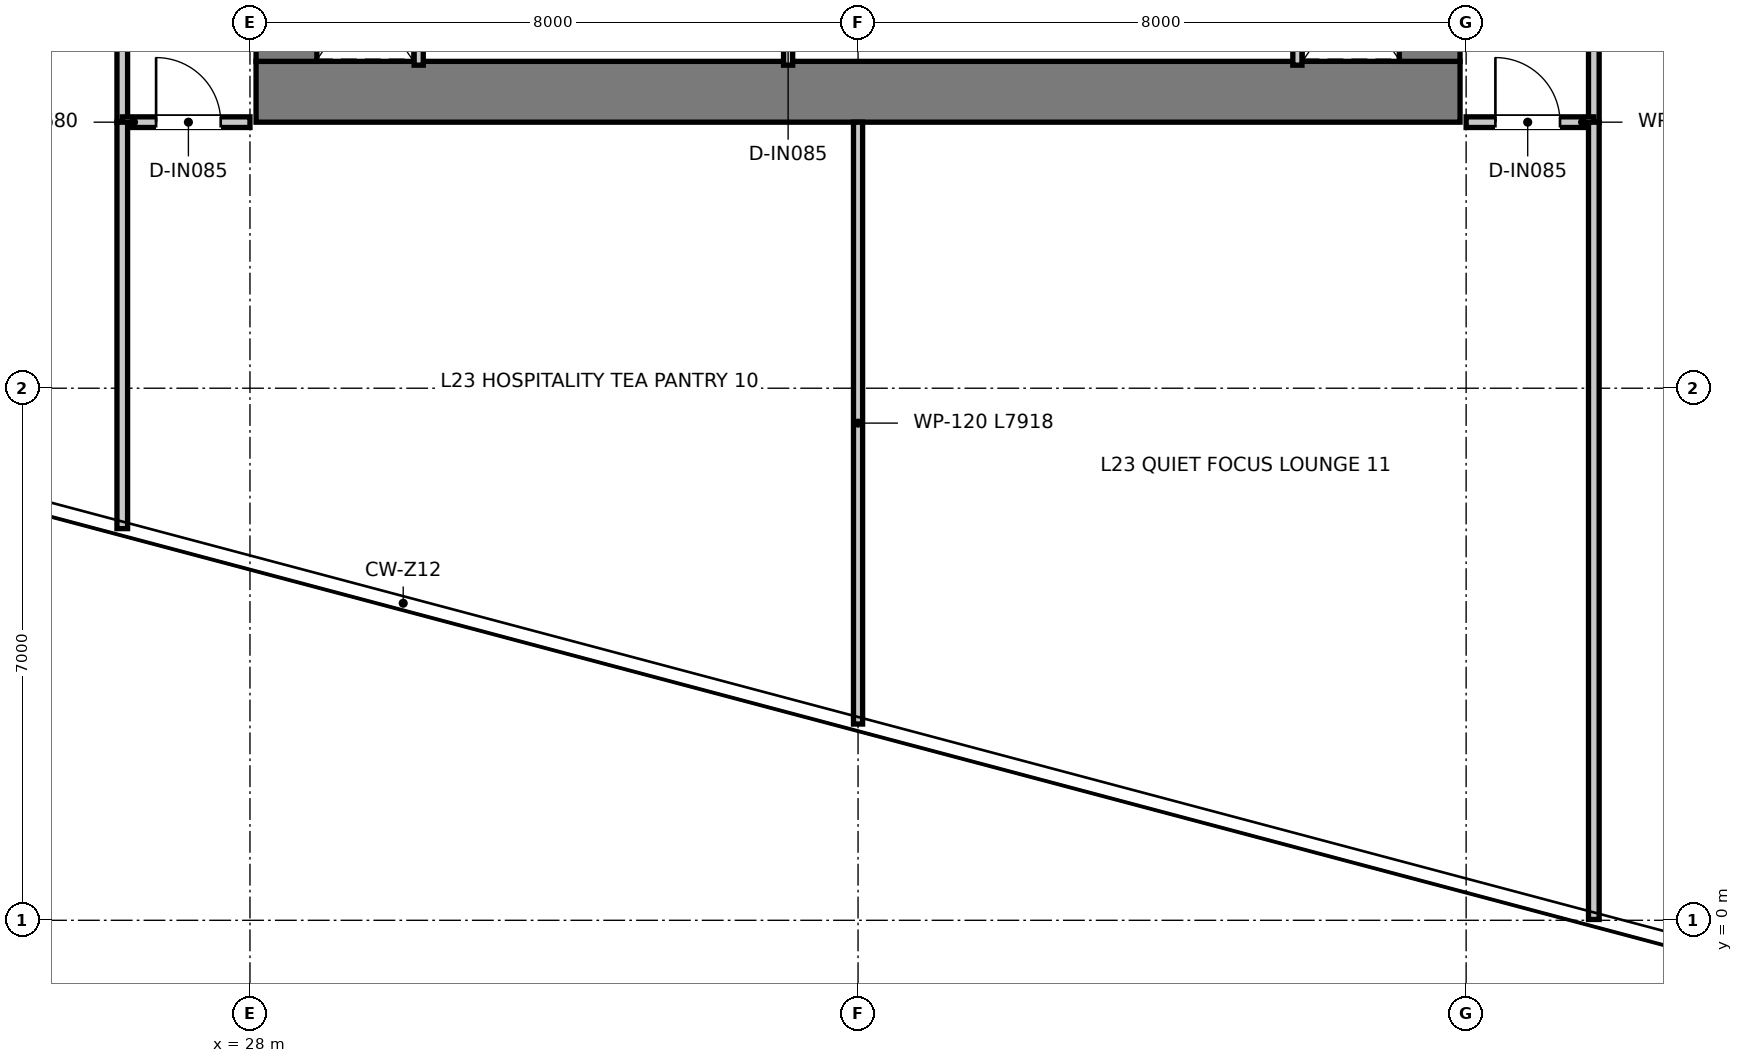
"""IFC4 building model, lengths in metres.
Left out: names, types, materials, properties, quantities, classifications, styles, units other than length and angle.
Written with IfcOpenShell. Run it as: python <this file> out.ifc"""

import sys

from ifc_helpers import new_model, si_unit, direction, frame, frame_2d, origin, place, context, subcontext, project, spatial, rectangle, extrude, element, fill, save


model = new_model("IFC4")
c1 = context("Model", 3, precision=1e-05, world=origin(), true_north=direction((0.0, 1.0)))
c2 = subcontext(c1, "Body", "Model", "MODEL_VIEW")
j1 = project(units=[si_unit("LENGTHUNIT", "METRE"), si_unit("PLANEANGLEUNIT", "RADIAN")], contexts=[c1])
p1 = place(None, origin())
s1 = spatial("IfcSite", under=j1, at=p1, CompositionType="ELEMENT")
p2 = place(p1, origin())
s2 = spatial("IfcBuilding", under=s1, at=p2, CompositionType="ELEMENT")
p3 = place(p2, frame((0.0, 0.0, 97.95)))
s3 = spatial("IfcBuildingStorey", under=s2, at=p3, CompositionType="ELEMENT", Elevation=97.95)
p4 = place(p3, frame((28.08, 10.9, 0.0), z_axis=(0.0, 0.0, 1.0), x_axis=(1.0, 0.0, 0.0)))
e1 = element("IfcWall", 1, at=p4, inside=s3, PredefinedType="SHEAR", context=c2, shape_type="SweptSolid", body=[
    extrude(rectangle(XDim=15.84, YDim=0.8, at=frame_2d((7.92, 0.0))), origin(), (0.0, 0.0, 1.0), 3.95),
])
for number, where, z_axis, x_axis in (
    (2, (28.48, 11.3, 0.0), (0.0, 0.0, 1.0), (0.0, 1.0, 0.0)),
    (3, (43.52, 11.3, 0.0), (0.0, 0.0, 1.0), (0.0, 1.0, 0.0)),
):
    element("IfcWall", number, at=place(p3, frame(where, z_axis=z_axis, x_axis=x_axis)), inside=s3, PredefinedType="SHEAR", context=c2, shape_type="SweptSolid", body=[
        extrude(rectangle(XDim=14.7, YDim=0.8, at=frame_2d((7.35, 0.0))), origin(), (0.0, 0.0, 1.0), 3.95),
    ])
for number, where, z_axis, x_axis in (
    (4, (30.22, 11.25, 0.0), (0.0, 0.0, 1.0), (0.0, 1.0, 0.0)),
    (5, (41.78, 11.25, 0.0), (0.0, 0.0, 1.0), (0.0, 1.0, 0.0)),
):
    element("IfcWall", number, at=place(p3, frame(where, z_axis=z_axis, x_axis=x_axis)), inside=s3, PredefinedType="PARTITIONING", context=c2, shape_type="SweptSolid", body=[
        extrude(rectangle(XDim=1.97, YDim=0.12, at=frame_2d((0.985, 0.0))), origin(), (0.0, 0.0, 1.0), 3.67),
    ])
p5 = place(p3, frame((35.08, 11.25, 0.0), z_axis=(0.0, 0.0, 1.0), x_axis=(0.0, 1.0, 0.0)))
e6 = element("IfcWall", 6, at=p5, inside=s3, PredefinedType="PARTITIONING", context=c2, shape_type="SweptSolid", body=[
    extrude(rectangle(XDim=1.97, YDim=0.12, at=frame_2d((0.985, 0.0))), origin(), (0.0, 0.0, 1.0), 3.67),
])
p6 = place(p5, frame((0.545, 0.0, 0.0)))
e7 = element("IfcOpeningElement", 7, at=p6, cuts=e6, PredefinedType="OPENING", context=c2, shape_type="SweptSolid", body=[
    extrude(rectangle(XDim=0.85, YDim=2.1, at=frame_2d((0.425, 1.05))), frame((0.0, 0.07, 0.0), z_axis=(0.0, -1.0, 0.0), x_axis=(1.0, 0.0, 0.0)), (0.0, 0.0, 1.0), 0.14),
])
p7 = place(p3, frame((26.32, 10.5, 0.0), z_axis=(0.0, 0.0, 1.0), x_axis=(0.0, 1.0, 0.0)))
e8 = element("IfcWall", 8, at=p7, inside=s3, PredefinedType="PARTITIONING", context=c2, shape_type="SweptSolid", body=[
    extrude(rectangle(XDim=25.62, YDim=0.14, at=frame_2d((12.81, 0.0))), origin(), (0.0, 0.0, 1.0), 2.97),
])
p8 = place(p7, frame((11.775, 0.0, 0.0)))
e9 = element("IfcOpeningElement", 9, at=p8, cuts=e8, PredefinedType="OPENING", context=c2, shape_type="SweptSolid", body=[
    extrude(rectangle(XDim=0.95, YDim=2.1, at=frame_2d((0.475, 1.05))), frame((0.0, 0.08, 0.0), z_axis=(0.0, -1.0, 0.0), x_axis=(1.0, 0.0, 0.0)), (0.0, 0.0, 1.0), 0.16),
])
p9 = place(p7, frame((20.375, 0.0, 0.0)))
e10 = element("IfcOpeningElement", 10, at=p9, cuts=e8, PredefinedType="OPENING", context=c2, shape_type="SweptSolid", body=[
    extrude(rectangle(XDim=0.95, YDim=2.1, at=frame_2d((0.475, 1.05))), frame((0.0, 0.08, 0.0), z_axis=(0.0, -1.0, 0.0), x_axis=(1.0, 0.0, 0.0)), (0.0, 0.0, 1.0), 0.16),
])
p10 = place(p3, frame((45.68, 10.5, 0.0), z_axis=(0.0, 0.0, 1.0), x_axis=(0.0, 1.0, 0.0)))
e11 = element("IfcWall", 11, at=p10, inside=s3, PredefinedType="PARTITIONING", context=c2, shape_type="SweptSolid", body=[
    extrude(rectangle(XDim=25.62, YDim=0.14, at=frame_2d((12.81, 0.0))), origin(), (0.0, 0.0, 1.0), 2.97),
])
p11 = place(p10, frame((8.275, 0.0, 0.0)))
e12 = element("IfcOpeningElement", 12, at=p11, cuts=e11, PredefinedType="OPENING", context=c2, shape_type="SweptSolid", body=[
    extrude(rectangle(XDim=0.95, YDim=2.1, at=frame_2d((0.475, 1.05))), frame((0.0, 0.08, 0.0), z_axis=(0.0, -1.0, 0.0), x_axis=(1.0, 0.0, 0.0)), (0.0, 0.0, 1.0), 0.16),
])
p12 = place(p10, frame((14.025, 0.0, 0.0)))
e13 = element("IfcOpeningElement", 13, at=p12, cuts=e11, PredefinedType="OPENING", context=c2, shape_type="SweptSolid", body=[
    extrude(rectangle(XDim=0.95, YDim=2.1, at=frame_2d((0.475, 1.05))), frame((0.0, 0.08, 0.0), z_axis=(0.0, -1.0, 0.0), x_axis=(1.0, 0.0, 0.0)), (0.0, 0.0, 1.0), 0.16),
])
p13 = place(p10, frame((20.875, 0.0, 0.0)))
e14 = element("IfcOpeningElement", 14, at=p13, cuts=e11, PredefinedType="OPENING", context=c2, shape_type="SweptSolid", body=[
    extrude(rectangle(XDim=0.95, YDim=2.1, at=frame_2d((0.475, 1.05))), frame((0.0, 0.08, 0.0), z_axis=(0.0, -1.0, 0.0), x_axis=(1.0, 0.0, 0.0)), (0.0, 0.0, 1.0), 0.16),
])
p14 = place(p3, frame((26.32, 10.5, 0.0), z_axis=(0.0, 0.0, 1.0), x_axis=(1.0, 0.0, 0.0)))
e15 = element("IfcWall", 15, at=p14, inside=s3, PredefinedType="PARTITIONING", context=c2, shape_type="SweptSolid", body=[
    extrude(rectangle(XDim=1.68, YDim=0.14, at=frame_2d((0.84, 0.0))), origin(), (0.0, 0.0, 1.0), 3.67),
])
p15 = place(p14, frame((0.445, 0.0, 0.0)))
e16 = element("IfcOpeningElement", 16, at=p15, cuts=e15, PredefinedType="OPENING", context=c2, shape_type="SweptSolid", body=[
    extrude(rectangle(XDim=0.85, YDim=2.1, at=frame_2d((0.425, 1.05))), frame((0.0, 0.08, 0.0), z_axis=(0.0, -1.0, 0.0), x_axis=(1.0, 0.0, 0.0)), (0.0, 0.0, 1.0), 0.16),
])
p16 = place(p3, frame((44.0, 10.5, 0.0), z_axis=(0.0, 0.0, 1.0), x_axis=(1.0, 0.0, 0.0)))
e17 = element("IfcWall", 17, at=p16, inside=s3, PredefinedType="PARTITIONING", context=c2, shape_type="SweptSolid", body=[
    extrude(rectangle(XDim=1.68, YDim=0.14, at=frame_2d((0.84, 0.0))), origin(), (0.0, 0.0, 1.0), 3.67),
])
p17 = place(p16, frame((0.385, 0.0, 0.0)))
e18 = element("IfcOpeningElement", 18, at=p17, cuts=e17, PredefinedType="OPENING", context=c2, shape_type="SweptSolid", body=[
    extrude(rectangle(XDim=0.85, YDim=2.1, at=frame_2d((0.425, 1.05))), frame((0.0, 0.08, 0.0), z_axis=(0.0, -1.0, 0.0), x_axis=(1.0, 0.0, 0.0)), (0.0, 0.0, 1.0), 0.16),
])
p18 = place(p3, frame((26.32, 5.153, 0.0), z_axis=(0.0, 0.0, 1.0), x_axis=(0.0, 1.0, 0.0)))
e19 = element("IfcWall", 19, at=p18, inside=s3, PredefinedType="PARTITIONING", context=c2, shape_type="SweptSolid", body=[
    extrude(rectangle(XDim=5.347, YDim=0.14, at=frame_2d((2.674, 0.0))), origin(), (0.0, 0.0, 1.0), 3.67),
])
p19 = place(p3, frame((45.68, 0.01, 0.0), z_axis=(0.0, 0.0, 1.0), x_axis=(0.0, 1.0, 0.0)))
e20 = element("IfcWall", 20, at=p19, inside=s3, PredefinedType="PARTITIONING", context=c2, shape_type="SweptSolid", body=[
    extrude(rectangle(XDim=10.49, YDim=0.14, at=frame_2d((5.245, 0.0))), origin(), (0.0, 0.0, 1.0), 3.67),
])
p20 = place(p3, frame((36.0, 2.582, 0.0), z_axis=(0.0, 0.0, 1.0), x_axis=(0.0, 1.0, 0.0)))
e21 = element("IfcWall", 21, at=p20, inside=s3, PredefinedType="PARTITIONING", context=c2, shape_type="SweptSolid", body=[
    extrude(rectangle(XDim=7.918, YDim=0.12, at=frame_2d((3.959, 0.0))), origin(), (0.0, 0.0, 1.0), 3.67),
])
p21 = place(p15, origin())
e22 = element("IfcDoor", 22, at=p21, inside=s3, OperationType="SINGLE_SWING_LEFT", PredefinedType="DOOR", context=c2, shape_type="SweptSolid", body=[
    extrude(rectangle(XDim=0.85, YDim=2.1, at=frame_2d((0.425, 1.05))), frame((0.0, 0.025, 0.0), z_axis=(0.0, -1.0, 0.0), x_axis=(1.0, 0.0, 0.0)), (0.0, 0.0, 1.0), 0.05),
])
fill(e16, e22)
p22 = place(p17, origin())
e23 = element("IfcDoor", 23, at=p22, inside=s3, OperationType="SINGLE_SWING_LEFT", PredefinedType="DOOR", context=c2, shape_type="SweptSolid", body=[
    extrude(rectangle(XDim=0.85, YDim=2.1, at=frame_2d((0.425, 1.05))), frame((0.0, 0.025, 0.0), z_axis=(0.0, -1.0, 0.0), x_axis=(1.0, 0.0, 0.0)), (0.0, 0.0, 1.0), 0.05),
])
fill(e18, e23)
save(model, sys.argv[1])
